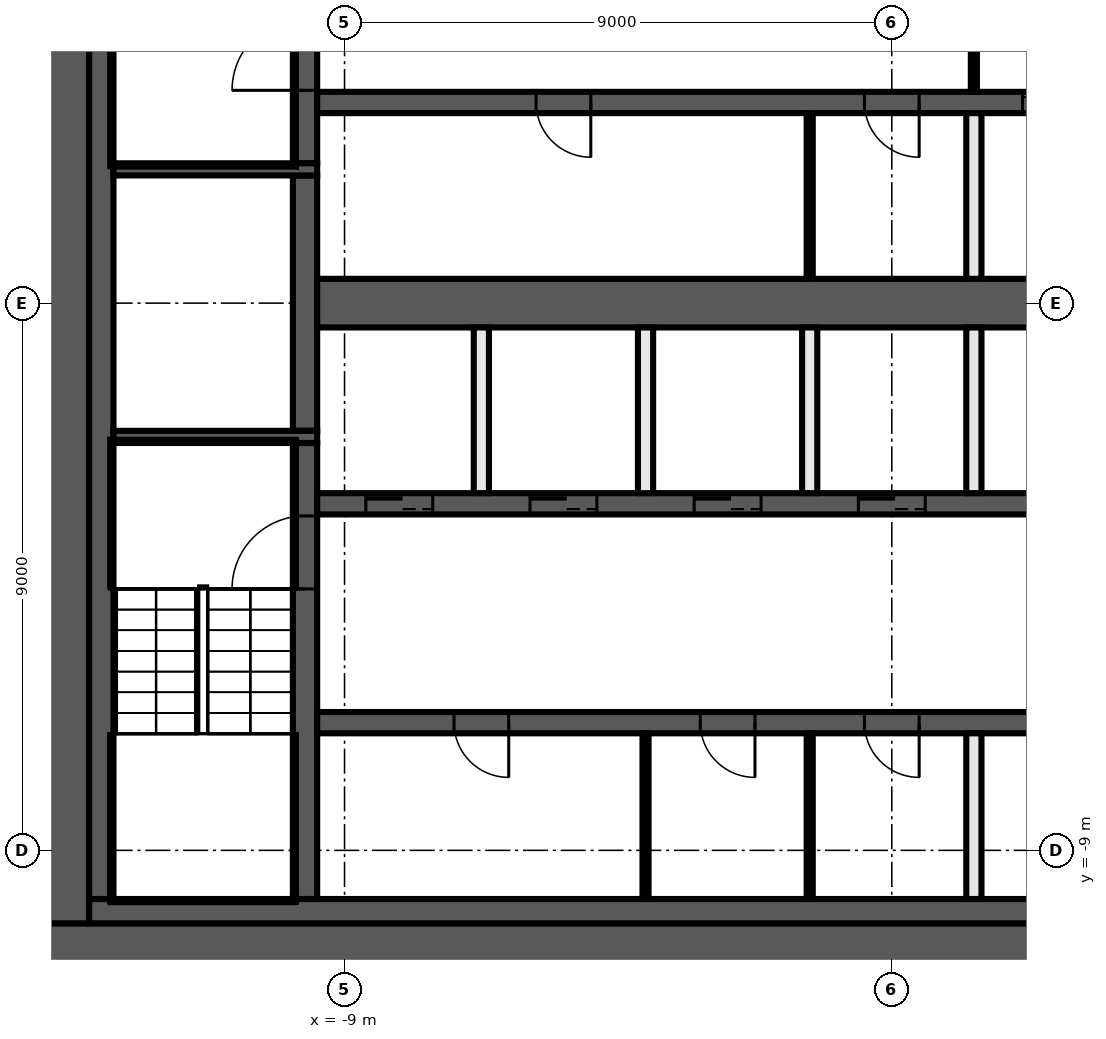
"""IFC4 building model, lengths in metres.
Left out: names, types, materials, properties, quantities, classifications, styles, units other than length and angle.
Written with IfcOpenShell. Run it as: python <this file> out.ifc"""

import sys

from ifc_helpers import new_model, si_unit, direction, frame, frame_2d, origin, place, context, subcontext, project, spatial, rectangle, extrude, element, fill, save


model = new_model("IFC4")
c1 = context("Model", 3, precision=1e-05, world=origin(), true_north=direction((0.0, 1.0)))
c2 = subcontext(c1, "Body", "Model", "MODEL_VIEW")
j1 = project(units=[si_unit("LENGTHUNIT", "METRE"), si_unit("PLANEANGLEUNIT", "RADIAN")], contexts=[c1])
p1 = place(None, origin())
s1 = spatial("IfcSite", under=j1, at=p1, CompositionType="ELEMENT")
p2 = place(p1, origin())
s2 = spatial("IfcBuilding", under=s1, at=p2, CompositionType="ELEMENT")
p3 = place(p2, frame((0.0, 0.0, 220.6)))
s3 = spatial("IfcBuildingStorey", under=s2, at=p3, CompositionType="ELEMENT", Elevation=220.6)
p4 = place(p3, frame((-23.414, -8.571, 0.0), z_axis=(0.0, 0.0, 1.0), x_axis=(0.696348823558, -0.717703501405, 0.0)))
e1 = element("IfcWall", 1, at=p4, inside=s3, PredefinedType="SOLIDWALL", context=c2, shape_type="SweptSolid", body=[
    extrude(rectangle(XDim=16.772, YDim=0.25, at=frame_2d((8.386, 0.0))), origin(), (0.0, 0.0, 1.0), 7.55),
])
p5 = place(p3, frame((14.0, -10.6, 0.0), z_axis=(0.0, 0.0, 1.0), x_axis=(-1.0, 0.0, 0.0)))
e2 = element("IfcWall", 2, at=p5, inside=s3, PredefinedType="SHEAR", context=c2, shape_type="SweptSolid", body=[
    extrude(rectangle(XDim=28.0, YDim=0.8, at=frame_2d((14.0, 0.0))), origin(), (0.0, 0.0, 1.0), 7.55),
])
p6 = place(p5, frame((5.1, 0.0, 0.0)))
e3 = element("IfcOpeningElement", 3, at=p6, cuts=e2, PredefinedType="OPENING", context=c2, shape_type="SweptSolid", body=[
    extrude(rectangle(XDim=1.6, YDim=2.1, at=frame_2d((0.8, 1.05))), frame((0.0, 0.41, 0.0), z_axis=(0.0, -1.0, 0.0), x_axis=(1.0, 0.0, 0.0)), (0.0, 0.0, 1.0), 0.82),
])
p7 = place(p3, frame((-13.6, -10.2, 0.0), z_axis=(0.0, 0.0, 1.0), x_axis=(0.0, 1.0, 0.0)))
e4 = element("IfcWall", 4, at=p7, inside=s3, PredefinedType="SHEAR", context=c2, shape_type="SweptSolid", body=[
    extrude(rectangle(XDim=20.4, YDim=0.8, at=frame_2d((10.2, 0.0))), origin(), (0.0, 0.0, 1.0), 7.55),
])
p8 = place(p3, frame((6.9, -10.0, 0.0), z_axis=(0.0, 0.0, 1.0), x_axis=(-1.0, 0.0, 0.0)))
e5 = element("IfcWall", 5, at=p8, inside=s3, PredefinedType="SHEAR", context=c2, shape_type="SweptSolid", body=[
    extrude(rectangle(XDim=20.1, YDim=0.4, at=frame_2d((10.05, 0.0))), origin(), (0.0, 0.0, 1.0), 7.55),
])
p9 = place(p3, frame((-13.0, -9.8, 0.0), z_axis=(0.0, 0.0, 1.0), x_axis=(0.0, 1.0, 0.0)))
e6 = element("IfcWall", 6, at=p9, inside=s3, PredefinedType="SHEAR", context=c2, shape_type="SweptSolid", body=[
    extrude(rectangle(XDim=19.6, YDim=0.4, at=frame_2d((9.8, 0.0))), origin(), (0.0, 0.0, 1.0), 7.55),
])
p10 = place(p3, frame((-9.65, -9.8, 0.0), z_axis=(0.0, 0.0, 1.0), x_axis=(0.0, 1.0, 0.0)))
e7 = element("IfcWall", 7, at=p10, inside=s3, PredefinedType="SHEAR", context=c2, shape_type="SweptSolid", body=[
    extrude(rectangle(XDim=7.5, YDim=0.4, at=frame_2d((3.75, 0.0))), origin(), (0.0, 0.0, 1.0), 7.55),
])
p11 = place(p10, frame((5.1, 0.0, 0.0)))
e8 = element("IfcOpeningElement", 8, at=p11, cuts=e7, PredefinedType="OPENING", context=c2, shape_type="SweptSolid", body=[
    extrude(rectangle(XDim=1.2, YDim=2.1, at=frame_2d((0.6, 1.05))), frame((0.0, 0.21, 0.0), z_axis=(0.0, -1.0, 0.0), x_axis=(1.0, 0.0, 0.0)), (0.0, 0.0, 1.0), 0.42),
])
p12 = place(p3, frame((-9.65, -2.1, 0.0), z_axis=(0.0, 0.0, 1.0), x_axis=(0.0, 1.0, 0.0)))
e9 = element("IfcWall", 9, at=p12, inside=s3, PredefinedType="SHEAR", context=c2, shape_type="SweptSolid", body=[
    extrude(rectangle(XDim=4.2, YDim=0.4, at=frame_2d((2.1, 0.0))), origin(), (0.0, 0.0, 1.0), 7.55),
])
p13 = place(p3, frame((-9.65, 2.3, 0.0), z_axis=(0.0, 0.0, 1.0), x_axis=(0.0, 1.0, 0.0)))
e10 = element("IfcWall", 10, at=p13, inside=s3, PredefinedType="SHEAR", context=c2, shape_type="SweptSolid", body=[
    extrude(rectangle(XDim=7.5, YDim=0.4, at=frame_2d((3.75, 0.0))), origin(), (0.0, 0.0, 1.0), 7.55),
])
p14 = place(p13, frame((1.2, 0.0, 0.0)))
e11 = element("IfcOpeningElement", 11, at=p14, cuts=e10, PredefinedType="OPENING", context=c2, shape_type="SweptSolid", body=[
    extrude(rectangle(XDim=1.2, YDim=2.1, at=frame_2d((0.6, 1.05))), frame((0.0, 0.21, 0.0), z_axis=(0.0, -1.0, 0.0), x_axis=(1.0, 0.0, 0.0)), (0.0, 0.0, 1.0), 0.42),
])
for number, where, z_axis, x_axis in (
    (12, (-9.45, 2.2, 0.0), (0.0, 0.0, 1.0), (-1.0, 0.0, 0.0)),
    (13, (-9.45, -2.2, 0.0), (0.0, 0.0, 1.0), (-1.0, 0.0, 0.0)),
):
    element("IfcWall", number, at=place(p3, frame(where, z_axis=z_axis, x_axis=x_axis)), inside=s3, PredefinedType="SHEAR", context=c2, shape_type="SweptSolid", body=[
        extrude(rectangle(XDim=3.35, YDim=0.2, at=frame_2d((1.675, 0.0))), origin(), (0.0, 0.0, 1.0), 7.55),
    ])
p15 = place(p3, frame((9.45, 3.3, 0.0), z_axis=(0.0, 0.0, 1.0), x_axis=(-1.0, 0.0, 0.0)))
e14 = element("IfcWall", 14, at=p15, inside=s3, PredefinedType="SHEAR", context=c2, shape_type="SweptSolid", body=[
    extrude(rectangle(XDim=18.9, YDim=0.35, at=frame_2d((9.45, 0.0))), origin(), (0.0, 0.0, 1.0), 7.55),
])
p16 = place(p15, frame((6.2, 0.0, 0.0)))
e15 = element("IfcOpeningElement", 15, at=p16, cuts=e14, PredefinedType="OPENING", context=c2, shape_type="SweptSolid", body=[
    extrude(rectangle(XDim=1.1, YDim=2.1, at=frame_2d((0.55, 1.05))), frame((0.0, 0.185, 0.0), z_axis=(0.0, -1.0, 0.0), x_axis=(1.0, 0.0, 0.0)), (0.0, 0.0, 1.0), 0.37),
])
p17 = place(p15, frame((3.5, 0.0, 0.0)))
e16 = element("IfcOpeningElement", 16, at=p17, cuts=e14, PredefinedType="OPENING", context=c2, shape_type="SweptSolid", body=[
    extrude(rectangle(XDim=1.1, YDim=2.1, at=frame_2d((0.55, 1.05))), frame((0.0, 0.185, 0.0), z_axis=(0.0, -1.0, 0.0), x_axis=(1.0, 0.0, 0.0)), (0.0, 0.0, 1.0), 0.37),
])
p18 = place(p15, frame((0.9, 0.0, 0.0)))
e17 = element("IfcOpeningElement", 17, at=p18, cuts=e14, PredefinedType="OPENING", context=c2, shape_type="SweptSolid", body=[
    extrude(rectangle(XDim=0.9, YDim=2.1, at=frame_2d((0.45, 1.05))), frame((0.0, 0.185, 0.0), z_axis=(0.0, -1.0, 0.0), x_axis=(1.0, 0.0, 0.0)), (0.0, 0.0, 1.0), 0.37),
])
p19 = place(p15, frame((14.4, 0.0, 0.0)))
e18 = element("IfcOpeningElement", 18, at=p19, cuts=e14, PredefinedType="OPENING", context=c2, shape_type="SweptSolid", body=[
    extrude(rectangle(XDim=0.9, YDim=2.1, at=frame_2d((0.45, 1.05))), frame((0.0, 0.185, 0.0), z_axis=(0.0, -1.0, 0.0), x_axis=(1.0, 0.0, 0.0)), (0.0, 0.0, 1.0), 0.37),
])
p20 = place(p15, frame((9.0, 0.0, 0.0)))
e19 = element("IfcOpeningElement", 19, at=p20, cuts=e14, PredefinedType="OPENING", context=c2, shape_type="SweptSolid", body=[
    extrude(rectangle(XDim=0.9, YDim=2.1, at=frame_2d((0.45, 1.05))), frame((0.0, 0.185, 0.0), z_axis=(0.0, -1.0, 0.0), x_axis=(1.0, 0.0, 0.0)), (0.0, 0.0, 1.0), 0.37),
])
p21 = place(p3, frame((-9.45, -3.3, 0.0), z_axis=(0.0, 0.0, 1.0), x_axis=(1.0, 0.0, 0.0)))
e20 = element("IfcWall", 20, at=p21, inside=s3, PredefinedType="SHEAR", context=c2, shape_type="SweptSolid", body=[
    extrude(rectangle(XDim=18.9, YDim=0.35, at=frame_2d((9.45, 0.0))), origin(), (0.0, 0.0, 1.0), 7.55),
])
p22 = place(p21, frame((0.8, 0.0, 0.0)))
e21 = element("IfcOpeningElement", 21, at=p22, cuts=e20, PredefinedType="OPENING", context=c2, shape_type="SweptSolid", body=[
    extrude(rectangle(XDim=1.1, YDim=2.1, at=frame_2d((0.55, 1.05))), frame((0.0, 0.185, 0.0), z_axis=(0.0, -1.0, 0.0), x_axis=(1.0, 0.0, 0.0)), (0.0, 0.0, 1.0), 0.37),
])
p23 = place(p21, frame((3.5, 0.0, 0.0)))
e22 = element("IfcOpeningElement", 22, at=p23, cuts=e20, PredefinedType="OPENING", context=c2, shape_type="SweptSolid", body=[
    extrude(rectangle(XDim=1.1, YDim=2.1, at=frame_2d((0.55, 1.05))), frame((0.0, 0.185, 0.0), z_axis=(0.0, -1.0, 0.0), x_axis=(1.0, 0.0, 0.0)), (0.0, 0.0, 1.0), 0.37),
])
p24 = place(p21, frame((6.2, 0.0, 0.0)))
e23 = element("IfcOpeningElement", 23, at=p24, cuts=e20, PredefinedType="OPENING", context=c2, shape_type="SweptSolid", body=[
    extrude(rectangle(XDim=1.1, YDim=2.1, at=frame_2d((0.55, 1.05))), frame((0.0, 0.185, 0.0), z_axis=(0.0, -1.0, 0.0), x_axis=(1.0, 0.0, 0.0)), (0.0, 0.0, 1.0), 0.37),
])
p25 = place(p21, frame((8.9, 0.0, 0.0)))
e24 = element("IfcOpeningElement", 24, at=p25, cuts=e20, PredefinedType="OPENING", context=c2, shape_type="SweptSolid", body=[
    extrude(rectangle(XDim=1.1, YDim=2.1, at=frame_2d((0.55, 1.05))), frame((0.0, 0.185, 0.0), z_axis=(0.0, -1.0, 0.0), x_axis=(1.0, 0.0, 0.0)), (0.0, 0.0, 1.0), 0.37),
])
p26 = place(p21, frame((17.0, 0.0, 0.0)))
e25 = element("IfcOpeningElement", 25, at=p26, cuts=e20, PredefinedType="OPENING", context=c2, shape_type="SweptSolid", body=[
    extrude(rectangle(XDim=1.1, YDim=2.1, at=frame_2d((0.55, 1.05))), frame((0.0, 0.185, 0.0), z_axis=(0.0, -1.0, 0.0), x_axis=(1.0, 0.0, 0.0)), (0.0, 0.0, 1.0), 0.37),
])
p27 = place(p21, frame((11.7, 0.0, 0.0)))
e26 = element("IfcOpeningElement", 26, at=p27, cuts=e20, PredefinedType="OPENING", context=c2, shape_type="SweptSolid", body=[
    extrude(rectangle(XDim=0.9, YDim=2.1, at=frame_2d((0.45, 1.05))), frame((0.0, 0.185, 0.0), z_axis=(0.0, -1.0, 0.0), x_axis=(1.0, 0.0, 0.0)), (0.0, 0.0, 1.0), 0.37),
])
p28 = place(p21, frame((14.4, 0.0, 0.0)))
e27 = element("IfcOpeningElement", 27, at=p28, cuts=e20, PredefinedType="OPENING", context=c2, shape_type="SweptSolid", body=[
    extrude(rectangle(XDim=0.9, YDim=2.1, at=frame_2d((0.45, 1.05))), frame((0.0, 0.185, 0.0), z_axis=(0.0, -1.0, 0.0), x_axis=(1.0, 0.0, 0.0)), (0.0, 0.0, 1.0), 0.37),
])
p29 = place(p3, frame((9.45, -6.9, 0.0), z_axis=(0.0, 0.0, 1.0), x_axis=(-1.0, 0.0, 0.0)))
e28 = element("IfcWall", 28, at=p29, inside=s3, PredefinedType="SHEAR", context=c2, shape_type="SweptSolid", body=[
    extrude(rectangle(XDim=18.9, YDim=0.35, at=frame_2d((9.45, 0.0))), origin(), (0.0, 0.0, 1.0), 7.55),
])
p30 = place(p29, frame((0.75, 0.0, 0.0)))
e29 = element("IfcOpeningElement", 29, at=p30, cuts=e28, PredefinedType="OPENING", context=c2, shape_type="SweptSolid", body=[
    extrude(rectangle(XDim=1.2, YDim=2.1, at=frame_2d((0.6, 1.05))), frame((0.0, 0.185, 0.0), z_axis=(0.0, -1.0, 0.0), x_axis=(1.0, 0.0, 0.0)), (0.0, 0.0, 1.0), 0.37),
])
p31 = place(p29, frame((15.75, 0.0, 0.0)))
e30 = element("IfcOpeningElement", 30, at=p31, cuts=e28, PredefinedType="OPENING", context=c2, shape_type="SweptSolid", body=[
    extrude(rectangle(XDim=0.9, YDim=2.1, at=frame_2d((0.45, 1.05))), frame((0.0, 0.185, 0.0), z_axis=(0.0, -1.0, 0.0), x_axis=(1.0, 0.0, 0.0)), (0.0, 0.0, 1.0), 0.37),
])
p32 = place(p29, frame((11.7, 0.0, 0.0)))
e31 = element("IfcOpeningElement", 31, at=p32, cuts=e28, PredefinedType="OPENING", context=c2, shape_type="SweptSolid", body=[
    extrude(rectangle(XDim=0.9, YDim=2.1, at=frame_2d((0.45, 1.05))), frame((0.0, 0.185, 0.0), z_axis=(0.0, -1.0, 0.0), x_axis=(1.0, 0.0, 0.0)), (0.0, 0.0, 1.0), 0.37),
])
p33 = place(p29, frame((9.0, 0.0, 0.0)))
e32 = element("IfcOpeningElement", 32, at=p33, cuts=e28, PredefinedType="OPENING", context=c2, shape_type="SweptSolid", body=[
    extrude(rectangle(XDim=0.9, YDim=2.1, at=frame_2d((0.45, 1.05))), frame((0.0, 0.185, 0.0), z_axis=(0.0, -1.0, 0.0), x_axis=(1.0, 0.0, 0.0)), (0.0, 0.0, 1.0), 0.37),
])
p34 = place(p3, frame((-9.45, 0.0, 0.0), z_axis=(0.0, 0.0, 1.0), x_axis=(1.0, 0.0, 0.0)))
e33 = element("IfcWall", 33, at=p34, inside=s3, PredefinedType="SHEAR", context=c2, shape_type="SweptSolid", body=[
    extrude(rectangle(XDim=18.9, YDim=0.8, at=frame_2d((9.45, 0.0))), origin(), (0.0, 0.0, 1.0), 7.55),
])
p35 = place(p3, frame((1.35, 6.725, 0.0), z_axis=(0.0, 0.0, 1.0), x_axis=(0.0, -1.0, 0.0)))
e34 = element("IfcWall", 34, at=p35, inside=s3, PredefinedType="PARTITIONING", context=c2, shape_type="SweptSolid", body=[
    extrude(rectangle(XDim=3.25, YDim=0.1, at=frame_2d((1.625, 0.0))), origin(), (0.0, 0.0, 1.0), 7.55),
])
p36 = place(p35, frame((1.025, 0.0, 0.0)))
e35 = element("IfcOpeningElement", 35, at=p36, cuts=e34, PredefinedType="OPENING", context=c2, shape_type="SweptSolid", body=[
    extrude(rectangle(XDim=1.2, YDim=2.1, at=frame_2d((0.6, 1.05))), frame((0.0, 0.06, 0.0), z_axis=(0.0, -1.0, 0.0), x_axis=(1.0, 0.0, 0.0)), (0.0, 0.0, 1.0), 0.12),
])
for number, where, z_axis, x_axis in (
    (36, (1.35, -9.8, 0.0), (0.0, 0.0, 1.0), (0.0, 1.0, 0.0)),
    (37, (1.35, -3.125, 0.0), (0.0, 0.0, 1.0), (0.0, 1.0, 0.0)),
    (38, (1.35, 0.4, 0.0), (0.0, 0.0, 1.0), (0.0, 1.0, 0.0)),
):
    element("IfcWall", number, at=place(p3, frame(where, z_axis=z_axis, x_axis=x_axis)), inside=s3, PredefinedType="SOLIDWALL", context=c2, shape_type="SweptSolid", body=[
        extrude(rectangle(XDim=2.725, YDim=0.25, at=frame_2d((1.363, 0.0))), origin(), (0.0, 0.0, 1.0), 7.55),
    ])
for number, where, z_axis, x_axis in (
    (39, (-1.35, -9.8, 0.0), (0.0, 0.0, 1.0), (0.0, 1.0, 0.0)),
    (40, (-1.35, 0.4, 0.0), (0.0, 0.0, 1.0), (0.0, 1.0, 0.0)),
):
    element("IfcWall", number, at=place(p3, frame(where, z_axis=z_axis, x_axis=x_axis)), inside=s3, PredefinedType="PARTITIONING", context=c2, shape_type="SweptSolid", body=[
        extrude(rectangle(XDim=2.725, YDim=0.1, at=frame_2d((1.363, 0.0))), origin(), (0.0, 0.0, 1.0), 7.55),
    ])
p37 = place(p3, frame((-1.35, -3.125, 0.0), z_axis=(0.0, 0.0, 1.0), x_axis=(0.0, 1.0, 0.0)))
e41 = element("IfcWall", 41, at=p37, inside=s3, PredefinedType="SOLIDWALL", context=c2, shape_type="SweptSolid", body=[
    extrude(rectangle(XDim=2.725, YDim=0.25, at=frame_2d((1.363, 0.0))), origin(), (0.0, 0.0, 1.0), 7.55),
])
p38 = place(p3, frame((-4.05, -9.8, 0.0), z_axis=(0.0, 0.0, 1.0), x_axis=(0.0, 1.0, 0.0)))
e42 = element("IfcWall", 42, at=p38, inside=s3, PredefinedType="PARTITIONING", context=c2, shape_type="SweptSolid", body=[
    extrude(rectangle(XDim=2.725, YDim=0.1, at=frame_2d((1.363, 0.0))), origin(), (0.0, 0.0, 1.0), 7.55),
])
for number, where, z_axis, x_axis in (
    (43, (-4.05, -3.125, 0.0), (0.0, 0.0, 1.0), (0.0, 1.0, 0.0)),
    (44, (-6.75, -3.125, 0.0), (0.0, 0.0, 1.0), (0.0, 1.0, 0.0)),
):
    element("IfcWall", number, at=place(p3, frame(where, z_axis=z_axis, x_axis=x_axis)), inside=s3, PredefinedType="SOLIDWALL", context=c2, shape_type="SweptSolid", body=[
        extrude(rectangle(XDim=2.725, YDim=0.25, at=frame_2d((1.363, 0.0))), origin(), (0.0, 0.0, 1.0), 7.55),
    ])
p39 = place(p16, origin())
e45 = element("IfcDoor", 45, at=p39, inside=s3, OperationType="DOUBLE_DOOR_SLIDING", PredefinedType="DOOR", context=c2, shape_type="SweptSolid", body=[
    extrude(rectangle(XDim=1.1, YDim=2.1, at=frame_2d((0.55, 1.05))), frame((0.0, 0.025, 0.0), z_axis=(0.0, -1.0, 0.0), x_axis=(1.0, 0.0, 0.0)), (0.0, 0.0, 1.0), 0.05),
])
fill(e15, e45)
p40 = place(p22, origin())
e46 = element("IfcDoor", 46, at=p40, inside=s3, OperationType="DOUBLE_DOOR_SLIDING", PredefinedType="DOOR", context=c2, shape_type="SweptSolid", body=[
    extrude(rectangle(XDim=1.1, YDim=2.1, at=frame_2d((0.55, 1.05))), frame((0.0, 0.025, 0.0), z_axis=(0.0, -1.0, 0.0), x_axis=(1.0, 0.0, 0.0)), (0.0, 0.0, 1.0), 0.05),
])
fill(e21, e46)
p41 = place(p23, origin())
e47 = element("IfcDoor", 47, at=p41, inside=s3, OperationType="DOUBLE_DOOR_SLIDING", PredefinedType="DOOR", context=c2, shape_type="SweptSolid", body=[
    extrude(rectangle(XDim=1.1, YDim=2.1, at=frame_2d((0.55, 1.05))), frame((0.0, 0.025, 0.0), z_axis=(0.0, -1.0, 0.0), x_axis=(1.0, 0.0, 0.0)), (0.0, 0.0, 1.0), 0.05),
])
fill(e22, e47)
p42 = place(p24, origin())
e48 = element("IfcDoor", 48, at=p42, inside=s3, OperationType="DOUBLE_DOOR_SLIDING", PredefinedType="DOOR", context=c2, shape_type="SweptSolid", body=[
    extrude(rectangle(XDim=1.1, YDim=2.1, at=frame_2d((0.55, 1.05))), frame((0.0, 0.025, 0.0), z_axis=(0.0, -1.0, 0.0), x_axis=(1.0, 0.0, 0.0)), (0.0, 0.0, 1.0), 0.05),
])
fill(e23, e48)
p43 = place(p25, origin())
e49 = element("IfcDoor", 49, at=p43, inside=s3, OperationType="DOUBLE_DOOR_SLIDING", PredefinedType="DOOR", context=c2, shape_type="SweptSolid", body=[
    extrude(rectangle(XDim=1.1, YDim=2.1, at=frame_2d((0.55, 1.05))), frame((0.0, 0.025, 0.0), z_axis=(0.0, -1.0, 0.0), x_axis=(1.0, 0.0, 0.0)), (0.0, 0.0, 1.0), 0.05),
])
fill(e24, e49)
p44 = place(p19, origin())
e50 = element("IfcDoor", 50, at=p44, inside=s3, OperationType="SINGLE_SWING_LEFT", PredefinedType="DOOR", context=c2, shape_type="SweptSolid", body=[
    extrude(rectangle(XDim=0.9, YDim=2.1, at=frame_2d((0.45, 1.05))), frame((0.0, 0.025, 0.0), z_axis=(0.0, -1.0, 0.0), x_axis=(1.0, 0.0, 0.0)), (0.0, 0.0, 1.0), 0.05),
])
fill(e18, e50)
p45 = place(p20, origin())
e51 = element("IfcDoor", 51, at=p45, inside=s3, OperationType="SINGLE_SWING_RIGHT", PredefinedType="DOOR", context=c2, shape_type="SweptSolid", body=[
    extrude(rectangle(XDim=0.9, YDim=2.1, at=frame_2d((0.45, 1.05))), frame((0.0, 0.025, 0.0), z_axis=(0.0, -1.0, 0.0), x_axis=(1.0, 0.0, 0.0)), (0.0, 0.0, 1.0), 0.05),
])
fill(e19, e51)
p46 = place(p31, origin())
e52 = element("IfcDoor", 52, at=p46, inside=s3, OperationType="SINGLE_SWING_LEFT", PredefinedType="DOOR", context=c2, shape_type="SweptSolid", body=[
    extrude(rectangle(XDim=0.9, YDim=2.1, at=frame_2d((0.45, 1.05))), frame((0.0, 0.025, 0.0), z_axis=(0.0, -1.0, 0.0), x_axis=(1.0, 0.0, 0.0)), (0.0, 0.0, 1.0), 0.05),
])
fill(e30, e52)
p47 = place(p32, origin())
e53 = element("IfcDoor", 53, at=p47, inside=s3, OperationType="SINGLE_SWING_RIGHT", PredefinedType="DOOR", context=c2, shape_type="SweptSolid", body=[
    extrude(rectangle(XDim=0.9, YDim=2.1, at=frame_2d((0.45, 1.05))), frame((0.0, 0.025, 0.0), z_axis=(0.0, -1.0, 0.0), x_axis=(1.0, 0.0, 0.0)), (0.0, 0.0, 1.0), 0.05),
])
fill(e31, e53)
p48 = place(p33, origin())
e54 = element("IfcDoor", 54, at=p48, inside=s3, OperationType="SINGLE_SWING_LEFT", PredefinedType="DOOR", context=c2, shape_type="SweptSolid", body=[
    extrude(rectangle(XDim=0.9, YDim=2.1, at=frame_2d((0.45, 1.05))), frame((0.0, 0.025, 0.0), z_axis=(0.0, -1.0, 0.0), x_axis=(1.0, 0.0, 0.0)), (0.0, 0.0, 1.0), 0.05),
])
fill(e32, e54)
p49 = place(p14, origin())
e55 = element("IfcDoor", 55, at=p49, inside=s3, OperationType="SINGLE_SWING_RIGHT", PredefinedType="DOOR", context=c2, shape_type="SweptSolid", body=[
    extrude(rectangle(XDim=1.2, YDim=2.1, at=frame_2d((0.6, 1.05))), frame((0.0, 0.025, 0.0), z_axis=(0.0, -1.0, 0.0), x_axis=(1.0, 0.0, 0.0)), (0.0, 0.0, 1.0), 0.05),
])
fill(e11, e55)
p50 = place(p11, origin())
e56 = element("IfcDoor", 56, at=p50, inside=s3, OperationType="SINGLE_SWING_LEFT", PredefinedType="DOOR", context=c2, shape_type="SweptSolid", body=[
    extrude(rectangle(XDim=1.2, YDim=2.1, at=frame_2d((0.6, 1.05))), frame((0.0, 0.025, 0.0), z_axis=(0.0, -1.0, 0.0), x_axis=(1.0, 0.0, 0.0)), (0.0, 0.0, 1.0), 0.05),
])
fill(e8, e56)
save(model, sys.argv[1])
